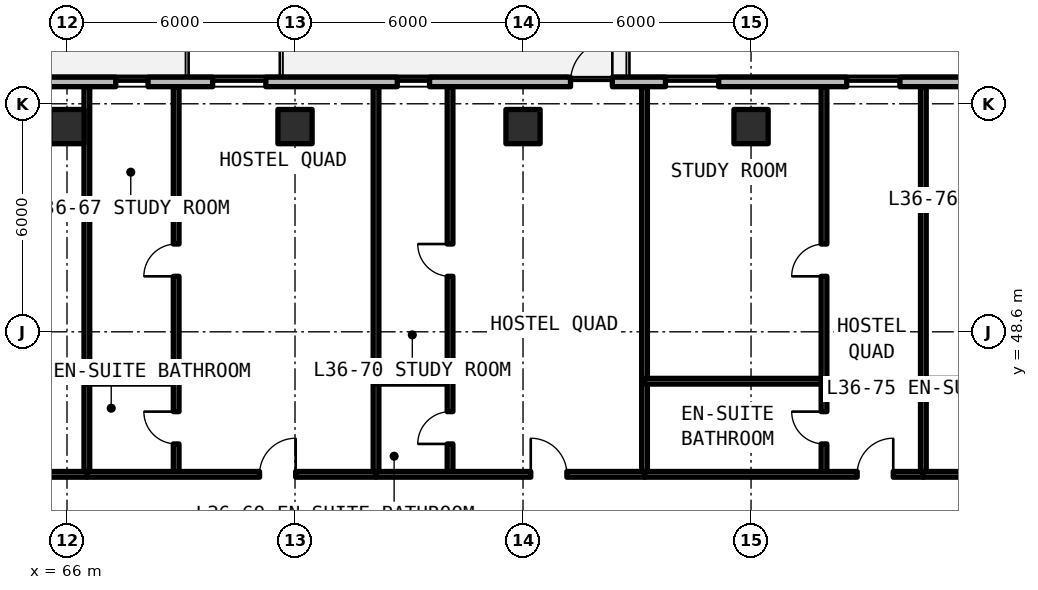
"""IFC4 building model, lengths in metres.
Left out: names, types, materials, properties, quantities, classifications, styles, units other than length and angle.
Written with IfcOpenShell. Run it as: python <this file> out.ifc"""

import sys

from ifc_helpers import new_model, si_unit, direction, frame, frame_2d, origin, origin_2d, place, context, subcontext, project, spatial, rectangle, extrude, element, fill, save


model = new_model("IFC4")
c1 = context("Model", 3, precision=1e-05, world=origin(), true_north=direction((0.0, 1.0)))
c2 = subcontext(c1, "Body", "Model", "MODEL_VIEW")
j1 = project(units=[si_unit("LENGTHUNIT", "METRE"), si_unit("PLANEANGLEUNIT", "RADIAN")], contexts=[c1])
p1 = place(None, origin())
s1 = spatial("IfcSite", under=j1, at=p1, CompositionType="ELEMENT")
p2 = place(p1, origin())
s2 = spatial("IfcBuilding", under=s1, at=p2, CompositionType="ELEMENT")
p3 = place(p2, frame((0.0, 0.0, 132.0)))
s3 = spatial("IfcBuildingStorey", under=s2, at=p3, CompositionType="ELEMENT", Elevation=132.0)
for number, where, z_axis, x_axis in (
    (1, (66.0, 54.0, 0.0), (0.0, 0.0, 1.0), (1.0, 0.0, 0.0)),
    (2, (72.0, 54.0, 0.0), (0.0, 0.0, 1.0), (1.0, 0.0, 0.0)),
    (3, (78.0, 54.0, 0.0), (0.0, 0.0, 1.0), (1.0, 0.0, 0.0)),
    (4, (84.0, 54.0, 0.0), (0.0, 0.0, 1.0), (1.0, 0.0, 0.0)),
):
    element("IfcColumn", number, at=place(p3, frame(where, z_axis=z_axis, x_axis=x_axis)), inside=s3, PredefinedType="COLUMN", context=c2, shape_type="SweptSolid", body=[
        extrude(rectangle(XDim=0.9, YDim=0.9, at=origin_2d()), origin(), (0.0, 0.0, 1.0), 3.3),
    ])
p4 = place(p3, frame((95.748, 55.175, 0.0), z_axis=(0.0, 0.0, 1.0), x_axis=(-1.0, 0.0, 0.0)))
e5 = element("IfcWall", 5, at=p4, inside=s3, PredefinedType="SOLIDWALL", context=c2, shape_type="SweptSolid", body=[
    extrude(rectangle(XDim=43.623, YDim=0.25, at=frame_2d((21.812, 0.0))), origin(), (0.0, 0.0, 1.0), 3.08),
])
p5 = place(p4, frame((31.598, 0.0, 0.0)))
e6 = element("IfcOpeningElement", 6, at=p5, cuts=e5, PredefinedType="OPENING", context=c2, shape_type="SweptSolid", body=[
    extrude(rectangle(XDim=1.1, YDim=2.15, at=frame_2d((0.55, 1.075))), frame((0.0, 0.135, 0.0), z_axis=(0.0, -1.0, 0.0), x_axis=(1.0, 0.0, 0.0)), (0.0, 0.0, 1.0), 0.27),
])
p6 = place(p4, frame((15.398, 0.0, 0.0)))
e7 = element("IfcOpeningElement", 7, at=p6, cuts=e5, PredefinedType="OPENING", context=c2, shape_type="SweptSolid", body=[
    extrude(rectangle(XDim=1.1, YDim=2.15, at=frame_2d((0.55, 1.075))), frame((0.0, 0.135, 0.0), z_axis=(0.0, -1.0, 0.0), x_axis=(1.0, 0.0, 0.0)), (0.0, 0.0, 1.0), 0.27),
])
p7 = place(p4, frame((40.333, 0.0, 0.78)))
e8 = element("IfcOpeningElement", 8, at=p7, cuts=e5, PredefinedType="OPENING", context=c2, shape_type="SweptSolid", body=[
    extrude(rectangle(XDim=0.85, YDim=1.65, at=frame_2d((0.425, 0.825))), frame((0.0, 0.135, 0.0), z_axis=(0.0, -1.0, 0.0), x_axis=(1.0, 0.0, 0.0)), (0.0, 0.0, 1.0), 0.27),
])
p8 = place(p4, frame((37.17, 0.0, 0.78)))
e9 = element("IfcOpeningElement", 9, at=p8, cuts=e5, PredefinedType="OPENING", context=c2, shape_type="SweptSolid", body=[
    extrude(rectangle(XDim=1.8, YDim=1.66, at=frame_2d((0.9, 0.83))), frame((0.0, 0.135, 0.0), z_axis=(0.0, -1.0, 0.0), x_axis=(1.0, 0.0, 0.0)), (0.0, 0.0, 1.0), 0.27),
])
p9 = place(p4, frame((27.615, 0.0, 0.78)))
e10 = element("IfcOpeningElement", 10, at=p9, cuts=e5, PredefinedType="OPENING", context=c2, shape_type="SweptSolid", body=[
    extrude(rectangle(XDim=0.85, YDim=1.65, at=frame_2d((0.425, 0.825))), frame((0.0, 0.135, 0.0), z_axis=(0.0, -1.0, 0.0), x_axis=(1.0, 0.0, 0.0)), (0.0, 0.0, 1.0), 0.27),
])
p10 = place(p4, frame((24.516, 0.0, 0.78)))
e11 = element("IfcOpeningElement", 11, at=p10, cuts=e5, PredefinedType="OPENING", context=c2, shape_type="SweptSolid", body=[
    extrude(rectangle(XDim=1.4, YDim=1.65, at=frame_2d((0.7, 0.825))), frame((0.0, 0.135, 0.0), z_axis=(0.0, -1.0, 0.0), x_axis=(1.0, 0.0, 0.0)), (0.0, 0.0, 1.0), 0.27),
])
p11 = place(p4, frame((20.208, 0.0, 0.78)))
e12 = element("IfcOpeningElement", 12, at=p11, cuts=e5, PredefinedType="OPENING", context=c2, shape_type="SweptSolid", body=[
    extrude(rectangle(XDim=0.85, YDim=1.65, at=frame_2d((0.425, 0.825))), frame((0.0, 0.135, 0.0), z_axis=(0.0, -1.0, 0.0), x_axis=(1.0, 0.0, 0.0)), (0.0, 0.0, 1.0), 0.27),
])
p12 = place(p4, frame((12.6, 0.0, 0.78)))
e13 = element("IfcOpeningElement", 13, at=p12, cuts=e5, PredefinedType="OPENING", context=c2, shape_type="SweptSolid", body=[
    extrude(rectangle(XDim=1.4, YDim=1.65, at=frame_2d((0.7, 0.825))), frame((0.0, 0.135, 0.0), z_axis=(0.0, -1.0, 0.0), x_axis=(1.0, 0.0, 0.0)), (0.0, 0.0, 1.0), 0.27),
])
p13 = place(p4, frame((7.831, 0.0, 0.78)))
e14 = element("IfcOpeningElement", 14, at=p13, cuts=e5, PredefinedType="OPENING", context=c2, shape_type="SweptSolid", body=[
    extrude(rectangle(XDim=1.4, YDim=1.65, at=frame_2d((0.7, 0.825))), frame((0.0, 0.135, 0.0), z_axis=(0.0, -1.0, 0.0), x_axis=(1.0, 0.0, 0.0)), (0.0, 0.0, 1.0), 0.27),
])
p14 = place(p4, frame((4.286, 0.0, 0.78)))
e15 = element("IfcOpeningElement", 15, at=p14, cuts=e5, PredefinedType="OPENING", context=c2, shape_type="SweptSolid", body=[
    extrude(rectangle(XDim=0.85, YDim=1.65, at=frame_2d((0.425, 0.825))), frame((0.0, 0.135, 0.0), z_axis=(0.0, -1.0, 0.0), x_axis=(1.0, 0.0, 0.0)), (0.0, 0.0, 1.0), 0.27),
])
p15 = place(p4, frame((1.098, 0.0, 0.78)))
e16 = element("IfcOpeningElement", 16, at=p15, cuts=e5, PredefinedType="OPENING", context=c2, shape_type="SweptSolid", body=[
    extrude(rectangle(XDim=1.8, YDim=1.66, at=frame_2d((0.9, 0.83))), frame((0.0, 0.135, 0.0), z_axis=(0.0, -1.0, 0.0), x_axis=(1.0, 0.0, 0.0)), (0.0, 0.0, 1.0), 0.27),
])
p16 = place(p3, frame((66.523, 44.85, 0.0), z_axis=(0.0, 0.0, 1.0), x_axis=(0.0, 1.0, 0.0)))
e17 = element("IfcWall", 17, at=p16, inside=s3, PredefinedType="SOLIDWALL", context=c2, shape_type="SweptSolid", body=[
    extrude(rectangle(XDim=10.2, YDim=0.15, at=frame_2d((5.1, 0.0))), origin(), (0.0, 0.0, 1.0), 2.35),
])
p17 = place(p3, frame((59.457, 44.85, 0.0), z_axis=(0.0, 0.0, 1.0), x_axis=(1.0, 0.0, 0.0)))
e18 = element("IfcWall", 18, at=p17, inside=s3, PredefinedType="SOLIDWALL", context=c2, shape_type="SweptSolid", body=[
    extrude(rectangle(XDim=7.065, YDim=0.15, at=frame_2d((3.533, 0.0))), origin(), (0.0, 0.0, 1.0), 2.35),
])
p18 = place(p17, frame((2.983, 0.0, 0.0)))
e19 = element("IfcOpeningElement", 19, at=p18, cuts=e18, PredefinedType="OPENING", context=c2, shape_type="SweptSolid", body=[
    extrude(rectangle(XDim=1.1, YDim=2.15, at=frame_2d((0.55, 1.075))), frame((0.0, 0.085, 0.0), z_axis=(0.0, -1.0, 0.0), x_axis=(1.0, 0.0, 0.0)), (0.0, 0.0, 1.0), 0.17),
])
p19 = place(p3, frame((74.132, 44.85, 0.0), z_axis=(0.0, 0.0, 1.0), x_axis=(0.0, 1.0, 0.0)))
e20 = element("IfcWall", 20, at=p19, inside=s3, PredefinedType="SOLIDWALL", context=c2, shape_type="SweptSolid", body=[
    extrude(rectangle(XDim=10.2, YDim=0.15, at=frame_2d((5.1, 0.0))), origin(), (0.0, 0.0, 1.0), 2.35),
])
p20 = place(p3, frame((66.523, 47.3, 0.0), z_axis=(0.0, 0.0, 1.0), x_axis=(1.0, 0.0, 0.0)))
e21 = element("IfcWall", 21, at=p20, inside=s3, PredefinedType="PARTITIONING", context=c2, shape_type="SweptSolid", body=[
    extrude(rectangle(XDim=2.35, YDim=0.15, at=frame_2d((1.175, 0.0))), origin(), (0.0, 0.0, 1.0), 2.35),
])
p21 = place(p3, frame((68.873, 44.85, 0.0), z_axis=(0.0, 0.0, 1.0), x_axis=(0.0, 1.0, 0.0)))
e22 = element("IfcWall", 22, at=p21, inside=s3, PredefinedType="PARTITIONING", context=c2, shape_type="SweptSolid", body=[
    extrude(rectangle(XDim=10.2, YDim=0.15, at=frame_2d((5.1, 0.0))), origin(), (0.0, 0.0, 1.0), 2.35),
])
p22 = place(p21, frame((0.8, 0.0, 0.0)))
e23 = element("IfcOpeningElement", 23, at=p22, cuts=e22, PredefinedType="OPENING", context=c2, shape_type="SweptSolid", body=[
    extrude(rectangle(XDim=0.85, YDim=2.1, at=frame_2d((0.425, 1.05))), frame((0.0, 0.085, 0.0), z_axis=(0.0, -1.0, 0.0), x_axis=(1.0, 0.0, 0.0)), (0.0, 0.0, 1.0), 0.17),
])
p23 = place(p21, frame((5.21, 0.0, 0.0)))
e24 = element("IfcOpeningElement", 24, at=p23, cuts=e22, PredefinedType="OPENING", context=c2, shape_type="SweptSolid", body=[
    extrude(rectangle(XDim=0.85, YDim=2.1, at=frame_2d((0.425, 1.05))), frame((0.0, 0.085, 0.0), z_axis=(0.0, -1.0, 0.0), x_axis=(1.0, 0.0, 0.0)), (0.0, 0.0, 1.0), 0.17),
])
p24 = place(p3, frame((66.523, 44.85, 0.0), z_axis=(0.0, 0.0, 1.0), x_axis=(1.0, 0.0, 0.0)))
e25 = element("IfcWall", 25, at=p24, inside=s3, PredefinedType="SOLIDWALL", context=c2, shape_type="SweptSolid", body=[
    extrude(rectangle(XDim=7.609, YDim=0.15, at=frame_2d((3.804, 0.0))), origin(), (0.0, 0.0, 1.0), 2.35),
])
p25 = place(p24, frame((4.544, 0.0, 0.0)))
e26 = element("IfcOpeningElement", 26, at=p25, cuts=e25, PredefinedType="OPENING", context=c2, shape_type="SweptSolid", body=[
    extrude(rectangle(XDim=0.95, YDim=2.15, at=frame_2d((0.475, 1.075))), frame((0.0, 0.085, 0.0), z_axis=(0.0, -1.0, 0.0), x_axis=(1.0, 0.0, 0.0)), (0.0, 0.0, 1.0), 0.17),
])
p26 = place(p3, frame((81.197, 44.85, 0.0), z_axis=(0.0, 0.0, 1.0), x_axis=(0.0, 1.0, 0.0)))
e27 = element("IfcWall", 27, at=p26, inside=s3, PredefinedType="SOLIDWALL", context=c2, shape_type="SweptSolid", body=[
    extrude(rectangle(XDim=10.2, YDim=0.15, at=frame_2d((5.1, 0.0))), origin(), (0.0, 0.0, 1.0), 2.35),
])
p27 = place(p3, frame((74.132, 47.3, 0.0), z_axis=(0.0, 0.0, 1.0), x_axis=(1.0, 0.0, 0.0)))
e28 = element("IfcWall", 28, at=p27, inside=s3, PredefinedType="PARTITIONING", context=c2, shape_type="SweptSolid", body=[
    extrude(rectangle(XDim=1.948, YDim=0.15, at=frame_2d((0.974, 0.0))), origin(), (0.0, 0.0, 1.0), 2.35),
])
p28 = place(p3, frame((76.08, 44.85, 0.0), z_axis=(0.0, 0.0, 1.0), x_axis=(0.0, 1.0, 0.0)))
e29 = element("IfcWall", 29, at=p28, inside=s3, PredefinedType="PARTITIONING", context=c2, shape_type="SweptSolid", body=[
    extrude(rectangle(XDim=10.2, YDim=0.15, at=frame_2d((5.1, 0.0))), origin(), (0.0, 0.0, 1.0), 2.35),
])
p29 = place(p28, frame((0.8, 0.0, 0.0)))
e30 = element("IfcOpeningElement", 30, at=p29, cuts=e29, PredefinedType="OPENING", context=c2, shape_type="SweptSolid", body=[
    extrude(rectangle(XDim=0.85, YDim=2.1, at=frame_2d((0.425, 1.05))), frame((0.0, 0.085, 0.0), z_axis=(0.0, -1.0, 0.0), x_axis=(1.0, 0.0, 0.0)), (0.0, 0.0, 1.0), 0.17),
])
p30 = place(p28, frame((5.21, 0.0, 0.0)))
e31 = element("IfcOpeningElement", 31, at=p30, cuts=e29, PredefinedType="OPENING", context=c2, shape_type="SweptSolid", body=[
    extrude(rectangle(XDim=0.85, YDim=2.1, at=frame_2d((0.425, 1.05))), frame((0.0, 0.085, 0.0), z_axis=(0.0, -1.0, 0.0), x_axis=(1.0, 0.0, 0.0)), (0.0, 0.0, 1.0), 0.17),
])
p31 = place(p3, frame((74.132, 44.85, 0.0), z_axis=(0.0, 0.0, 1.0), x_axis=(1.0, 0.0, 0.0)))
e32 = element("IfcWall", 32, at=p31, inside=s3, PredefinedType="SOLIDWALL", context=c2, shape_type="SweptSolid", body=[
    extrude(rectangle(XDim=7.066, YDim=0.15, at=frame_2d((3.533, 0.0))), origin(), (0.0, 0.0, 1.0), 2.35),
])
p32 = place(p31, frame((4.072, 0.0, 0.0)))
e33 = element("IfcOpeningElement", 33, at=p32, cuts=e32, PredefinedType="OPENING", context=c2, shape_type="SweptSolid", body=[
    extrude(rectangle(XDim=0.95, YDim=2.15, at=frame_2d((0.475, 1.075))), frame((0.0, 0.085, 0.0), z_axis=(0.0, -1.0, 0.0), x_axis=(1.0, 0.0, 0.0)), (0.0, 0.0, 1.0), 0.17),
])
p33 = place(p3, frame((88.534, 44.85, 0.0), z_axis=(0.0, 0.0, 1.0), x_axis=(0.0, 1.0, 0.0)))
e34 = element("IfcWall", 34, at=p33, inside=s3, PredefinedType="SOLIDWALL", context=c2, shape_type="SweptSolid", body=[
    extrude(rectangle(XDim=10.2, YDim=0.15, at=frame_2d((5.1, 0.0))), origin(), (0.0, 0.0, 1.0), 2.35),
])
p34 = place(p3, frame((81.197, 47.3, 0.0), z_axis=(0.0, 0.0, 1.0), x_axis=(1.0, 0.0, 0.0)))
e35 = element("IfcWall", 35, at=p34, inside=s3, PredefinedType="PARTITIONING", context=c2, shape_type="SweptSolid", body=[
    extrude(rectangle(XDim=4.723, YDim=0.15, at=frame_2d((2.361, 0.0))), origin(), (0.0, 0.0, 1.0), 2.35),
])
p35 = place(p3, frame((85.92, 44.85, 0.0), z_axis=(0.0, 0.0, 1.0), x_axis=(0.0, 1.0, 0.0)))
e36 = element("IfcWall", 36, at=p35, inside=s3, PredefinedType="PARTITIONING", context=c2, shape_type="SweptSolid", body=[
    extrude(rectangle(XDim=10.2, YDim=0.15, at=frame_2d((5.1, 0.0))), origin(), (0.0, 0.0, 1.0), 2.35),
])
p36 = place(p35, frame((0.8, 0.0, 0.0)))
e37 = element("IfcOpeningElement", 37, at=p36, cuts=e36, PredefinedType="OPENING", context=c2, shape_type="SweptSolid", body=[
    extrude(rectangle(XDim=0.85, YDim=2.1, at=frame_2d((0.425, 1.05))), frame((0.0, 0.085, 0.0), z_axis=(0.0, -1.0, 0.0), x_axis=(1.0, 0.0, 0.0)), (0.0, 0.0, 1.0), 0.17),
])
p37 = place(p35, frame((5.21, 0.0, 0.0)))
e38 = element("IfcOpeningElement", 38, at=p37, cuts=e36, PredefinedType="OPENING", context=c2, shape_type="SweptSolid", body=[
    extrude(rectangle(XDim=0.85, YDim=2.1, at=frame_2d((0.425, 1.05))), frame((0.0, 0.085, 0.0), z_axis=(0.0, -1.0, 0.0), x_axis=(1.0, 0.0, 0.0)), (0.0, 0.0, 1.0), 0.17),
])
p38 = place(p3, frame((81.197, 44.85, 0.0), z_axis=(0.0, 0.0, 1.0), x_axis=(1.0, 0.0, 0.0)))
e39 = element("IfcWall", 39, at=p38, inside=s3, PredefinedType="SOLIDWALL", context=c2, shape_type="SweptSolid", body=[
    extrude(rectangle(XDim=7.337, YDim=0.15, at=frame_2d((3.668, 0.0))), origin(), (0.0, 0.0, 1.0), 2.35),
])
p39 = place(p38, frame((5.595, 0.0, 0.0)))
e40 = element("IfcOpeningElement", 40, at=p39, cuts=e39, PredefinedType="OPENING", context=c2, shape_type="SweptSolid", body=[
    extrude(rectangle(XDim=0.95, YDim=2.15, at=frame_2d((0.475, 1.075))), frame((0.0, 0.085, 0.0), z_axis=(0.0, -1.0, 0.0), x_axis=(1.0, 0.0, 0.0)), (0.0, 0.0, 1.0), 0.17),
])
p40 = place(p3, frame((88.534, 47.3, 0.0), z_axis=(0.0, 0.0, 1.0), x_axis=(1.0, 0.0, 0.0)))
e41 = element("IfcWall", 41, at=p40, inside=s3, PredefinedType="PARTITIONING", context=c2, shape_type="SweptSolid", body=[
    extrude(rectangle(XDim=3.385, YDim=0.15, at=frame_2d((1.693, 0.0))), origin(), (0.0, 0.0, 1.0), 2.35),
])
p41 = place(p3, frame((88.534, 44.85, 0.0), z_axis=(0.0, 0.0, 1.0), x_axis=(1.0, 0.0, 0.0)))
e42 = element("IfcWall", 42, at=p41, inside=s3, PredefinedType="SOLIDWALL", context=c2, shape_type="SweptSolid", body=[
    extrude(rectangle(XDim=7.066, YDim=0.15, at=frame_2d((3.533, 0.0))), origin(), (0.0, 0.0, 1.0), 2.35),
])
p42 = place(p41, frame((4.791, 0.0, 0.0)))
e43 = element("IfcOpeningElement", 43, at=p42, cuts=e42, PredefinedType="OPENING", context=c2, shape_type="SweptSolid", body=[
    extrude(rectangle(XDim=0.95, YDim=2.15, at=frame_2d((0.475, 1.075))), frame((0.0, 0.085, 0.0), z_axis=(0.0, -1.0, 0.0), x_axis=(1.0, 0.0, 0.0)), (0.0, 0.0, 1.0), 0.17),
])
p43 = place(p6, frame((1.1, 0.0, 0.0), z_axis=(0.0, 0.0, 1.0), x_axis=(-1.0, 0.0, 0.0)))
e44 = element("IfcDoor", 44, at=p43, inside=s3, OperationType="SINGLE_SWING_LEFT", PredefinedType="DOOR", context=c2, shape_type="SweptSolid", body=[
    extrude(rectangle(XDim=1.1, YDim=2.15, at=frame_2d((0.55, 1.075))), frame((0.0, 0.025, 0.0), z_axis=(0.0, -1.0, 0.0), x_axis=(1.0, 0.0, 0.0)), (0.0, 0.0, 1.0), 0.05),
])
fill(e7, e44)
p44 = place(p9, origin())
e45 = element("IfcWindow", 45, at=p44, inside=s3, PartitioningType="SINGLE_PANEL", PredefinedType="WINDOW", context=c2, shape_type="SweptSolid", body=[
    extrude(rectangle(XDim=0.85, YDim=1.65, at=frame_2d((0.425, 0.825))), frame((0.0, 0.03, 0.0), z_axis=(0.0, -1.0, 0.0), x_axis=(1.0, 0.0, 0.0)), (0.0, 0.0, 1.0), 0.06),
])
fill(e10, e45)
p45 = place(p10, origin())
e46 = element("IfcWindow", 46, at=p45, inside=s3, PartitioningType="SINGLE_PANEL", PredefinedType="WINDOW", context=c2, shape_type="SweptSolid", body=[
    extrude(rectangle(XDim=1.4, YDim=1.65, at=frame_2d((0.7, 0.825))), frame((0.0, 0.03, 0.0), z_axis=(0.0, -1.0, 0.0), x_axis=(1.0, 0.0, 0.0)), (0.0, 0.0, 1.0), 0.06),
])
fill(e11, e46)
p46 = place(p11, origin())
e47 = element("IfcWindow", 47, at=p46, inside=s3, PartitioningType="SINGLE_PANEL", PredefinedType="WINDOW", context=c2, shape_type="SweptSolid", body=[
    extrude(rectangle(XDim=0.85, YDim=1.65, at=frame_2d((0.425, 0.825))), frame((0.0, 0.03, 0.0), z_axis=(0.0, -1.0, 0.0), x_axis=(1.0, 0.0, 0.0)), (0.0, 0.0, 1.0), 0.06),
])
fill(e12, e47)
p47 = place(p12, origin())
e48 = element("IfcWindow", 48, at=p47, inside=s3, PartitioningType="SINGLE_PANEL", PredefinedType="WINDOW", context=c2, shape_type="SweptSolid", body=[
    extrude(rectangle(XDim=1.4, YDim=1.65, at=frame_2d((0.7, 0.825))), frame((0.0, 0.03, 0.0), z_axis=(0.0, -1.0, 0.0), x_axis=(1.0, 0.0, 0.0)), (0.0, 0.0, 1.0), 0.06),
])
fill(e13, e48)
p48 = place(p13, origin())
e49 = element("IfcWindow", 49, at=p48, inside=s3, PartitioningType="SINGLE_PANEL", PredefinedType="WINDOW", context=c2, shape_type="SweptSolid", body=[
    extrude(rectangle(XDim=1.4, YDim=1.65, at=frame_2d((0.7, 0.825))), frame((0.0, 0.03, 0.0), z_axis=(0.0, -1.0, 0.0), x_axis=(1.0, 0.0, 0.0)), (0.0, 0.0, 1.0), 0.06),
])
fill(e14, e49)
p49 = place(p22, origin())
e50 = element("IfcDoor", 50, at=p49, inside=s3, OperationType="SINGLE_SWING_RIGHT", PredefinedType="DOOR", context=c2, shape_type="SweptSolid", body=[
    extrude(rectangle(XDim=0.85, YDim=2.1, at=frame_2d((0.425, 1.05))), frame((0.0, 0.025, 0.0), z_axis=(0.0, -1.0, 0.0), x_axis=(1.0, 0.0, 0.0)), (0.0, 0.0, 1.0), 0.05),
])
fill(e23, e50)
p50 = place(p23, origin())
e51 = element("IfcDoor", 51, at=p50, inside=s3, OperationType="SINGLE_SWING_LEFT", PredefinedType="DOOR", context=c2, shape_type="SweptSolid", body=[
    extrude(rectangle(XDim=0.85, YDim=2.1, at=frame_2d((0.425, 1.05))), frame((0.0, 0.025, 0.0), z_axis=(0.0, -1.0, 0.0), x_axis=(1.0, 0.0, 0.0)), (0.0, 0.0, 1.0), 0.05),
])
fill(e24, e51)
p51 = place(p25, origin())
e52 = element("IfcDoor", 52, at=p51, inside=s3, OperationType="SINGLE_SWING_RIGHT", PredefinedType="DOOR", context=c2, shape_type="SweptSolid", body=[
    extrude(rectangle(XDim=0.95, YDim=2.15, at=frame_2d((0.475, 1.075))), frame((0.0, 0.025, 0.0), z_axis=(0.0, -1.0, 0.0), x_axis=(1.0, 0.0, 0.0)), (0.0, 0.0, 1.0), 0.05),
])
fill(e26, e52)
p52 = place(p29, origin())
e53 = element("IfcDoor", 53, at=p52, inside=s3, OperationType="SINGLE_SWING_LEFT", PredefinedType="DOOR", context=c2, shape_type="SweptSolid", body=[
    extrude(rectangle(XDim=0.85, YDim=2.1, at=frame_2d((0.425, 1.05))), frame((0.0, 0.025, 0.0), z_axis=(0.0, -1.0, 0.0), x_axis=(1.0, 0.0, 0.0)), (0.0, 0.0, 1.0), 0.05),
])
fill(e30, e53)
p53 = place(p30, origin())
e54 = element("IfcDoor", 54, at=p53, inside=s3, OperationType="SINGLE_SWING_RIGHT", PredefinedType="DOOR", context=c2, shape_type="SweptSolid", body=[
    extrude(rectangle(XDim=0.85, YDim=2.1, at=frame_2d((0.425, 1.05))), frame((0.0, 0.025, 0.0), z_axis=(0.0, -1.0, 0.0), x_axis=(1.0, 0.0, 0.0)), (0.0, 0.0, 1.0), 0.05),
])
fill(e31, e54)
p54 = place(p32, origin())
e55 = element("IfcDoor", 55, at=p54, inside=s3, OperationType="SINGLE_SWING_LEFT", PredefinedType="DOOR", context=c2, shape_type="SweptSolid", body=[
    extrude(rectangle(XDim=0.95, YDim=2.15, at=frame_2d((0.475, 1.075))), frame((0.0, 0.025, 0.0), z_axis=(0.0, -1.0, 0.0), x_axis=(1.0, 0.0, 0.0)), (0.0, 0.0, 1.0), 0.05),
])
fill(e33, e55)
p55 = place(p36, origin())
e56 = element("IfcDoor", 56, at=p55, inside=s3, OperationType="SINGLE_SWING_RIGHT", PredefinedType="DOOR", context=c2, shape_type="SweptSolid", body=[
    extrude(rectangle(XDim=0.85, YDim=2.1, at=frame_2d((0.425, 1.05))), frame((0.0, 0.025, 0.0), z_axis=(0.0, -1.0, 0.0), x_axis=(1.0, 0.0, 0.0)), (0.0, 0.0, 1.0), 0.05),
])
fill(e37, e56)
p56 = place(p37, origin())
e57 = element("IfcDoor", 57, at=p56, inside=s3, OperationType="SINGLE_SWING_LEFT", PredefinedType="DOOR", context=c2, shape_type="SweptSolid", body=[
    extrude(rectangle(XDim=0.85, YDim=2.1, at=frame_2d((0.425, 1.05))), frame((0.0, 0.025, 0.0), z_axis=(0.0, -1.0, 0.0), x_axis=(1.0, 0.0, 0.0)), (0.0, 0.0, 1.0), 0.05),
])
fill(e38, e57)
p57 = place(p39, origin())
e58 = element("IfcDoor", 58, at=p57, inside=s3, OperationType="SINGLE_SWING_RIGHT", PredefinedType="DOOR", context=c2, shape_type="SweptSolid", body=[
    extrude(rectangle(XDim=0.95, YDim=2.15, at=frame_2d((0.475, 1.075))), frame((0.0, 0.025, 0.0), z_axis=(0.0, -1.0, 0.0), x_axis=(1.0, 0.0, 0.0)), (0.0, 0.0, 1.0), 0.05),
])
fill(e40, e58)
save(model, sys.argv[1])
